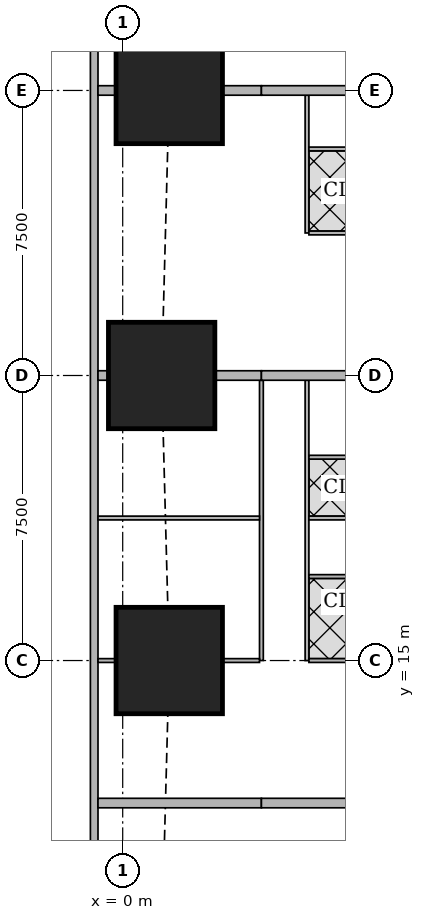
"""IFC4 building model, lengths in metres.
Left out: names, types, materials, properties, quantities, classifications, styles, units other than length and angle.
Written with IfcOpenShell. Run it as: python <this file> out.ifc"""

import sys

from ifc_helpers import new_model, si_unit, direction, frame, frame_2d, origin, origin_2d, place, context, subcontext, project, spatial, rectangle, extrude, element, fill, save


model = new_model("IFC4")
c1 = context("Model", 3, precision=1e-05, world=origin(), true_north=direction((0.0, 1.0)))
c2 = subcontext(c1, "Body", "Model", "MODEL_VIEW")
j1 = project(units=[si_unit("LENGTHUNIT", "METRE"), si_unit("PLANEANGLEUNIT", "RADIAN")], contexts=[c1])
p1 = place(None, origin())
s1 = spatial("IfcSite", under=j1, at=p1, CompositionType="ELEMENT")
p2 = place(p1, origin())
s2 = spatial("IfcBuilding", under=s1, at=p2, CompositionType="ELEMENT")
p3 = place(p2, frame((0.0, 0.0, 53.75)))
s3 = spatial("IfcBuildingStorey", under=s2, at=p3, CompositionType="ELEMENT", Elevation=53.75)
for number, where, z_axis, x_axis in (
    (1, (1.225, 15.0, 0.0), (0.0, 0.0, 1.0), (1.0, 0.0, 0.0)),
    (2, (1.025, 22.5, 0.0), (0.0, 0.0, 1.0), (1.0, 0.0, 0.0)),
    (3, (1.225, 30.0, 0.0), (0.0, 0.0, 1.0), (1.0, 0.0, 0.0)),
):
    element("IfcColumn", number, at=place(p3, frame(where, z_axis=z_axis, x_axis=x_axis)), inside=s3, PredefinedType="COLUMN", context=c2, shape_type="SweptSolid", body=[
        extrude(rectangle(XDim=2.8, YDim=2.8, at=origin_2d()), origin(), (0.0, 0.0, 1.0), 3.75),
    ])
p4 = place(p3, frame((-0.75, 42.837, 0.0), z_axis=(0.0, 0.0, 1.0), x_axis=(0.0, -1.0, 0.0)))
e4 = element("IfcWall", 4, at=p4, inside=s3, PredefinedType="SOLIDWALL", context=c2, shape_type="SweptSolid", body=[
    extrude(rectangle(XDim=40.674, YDim=0.2, at=frame_2d((20.337, 0.0))), origin(), (0.0, 0.0, 1.0), 3.5),
])
p5 = place(p4, frame((1.78, 0.0, 0.9)))
e5 = element("IfcOpeningElement", 5, at=p5, cuts=e4, PredefinedType="OPENING", context=c2, shape_type="SweptSolid", body=[
    extrude(rectangle(XDim=1.8, YDim=1.5, at=frame_2d((0.9, 0.75))), frame((0.0, 0.11, 0.0), z_axis=(0.0, -1.0, 0.0), x_axis=(1.0, 0.0, 0.0)), (0.0, 0.0, 1.0), 0.22),
])
p6 = place(p4, frame((6.312, 0.0, 0.9)))
e6 = element("IfcOpeningElement", 6, at=p6, cuts=e4, PredefinedType="OPENING", context=c2, shape_type="SweptSolid", body=[
    extrude(rectangle(XDim=1.8, YDim=1.5, at=frame_2d((0.9, 0.75))), frame((0.0, 0.11, 0.0), z_axis=(0.0, -1.0, 0.0), x_axis=(1.0, 0.0, 0.0)), (0.0, 0.0, 1.0), 0.22),
])
p7 = place(p4, frame((10.062, 0.0, 0.9)))
e7 = element("IfcOpeningElement", 7, at=p7, cuts=e4, PredefinedType="OPENING", context=c2, shape_type="SweptSolid", body=[
    extrude(rectangle(XDim=1.8, YDim=1.5, at=frame_2d((0.9, 0.75))), frame((0.0, 0.11, 0.0), z_axis=(0.0, -1.0, 0.0), x_axis=(1.0, 0.0, 0.0)), (0.0, 0.0, 1.0), 0.22),
])
p8 = place(p4, frame((13.812, 0.0, 0.9)))
e8 = element("IfcOpeningElement", 8, at=p8, cuts=e4, PredefinedType="OPENING", context=c2, shape_type="SweptSolid", body=[
    extrude(rectangle(XDim=1.8, YDim=1.5, at=frame_2d((0.9, 0.75))), frame((0.0, 0.11, 0.0), z_axis=(0.0, -1.0, 0.0), x_axis=(1.0, 0.0, 0.0)), (0.0, 0.0, 1.0), 0.22),
])
p9 = place(p4, frame((17.562, 0.0, 0.9)))
e9 = element("IfcOpeningElement", 9, at=p9, cuts=e4, PredefinedType="OPENING", context=c2, shape_type="SweptSolid", body=[
    extrude(rectangle(XDim=1.8, YDim=1.5, at=frame_2d((0.9, 0.75))), frame((0.0, 0.11, 0.0), z_axis=(0.0, -1.0, 0.0), x_axis=(1.0, 0.0, 0.0)), (0.0, 0.0, 1.0), 0.22),
])
p10 = place(p4, frame((21.312, 0.0, 0.9)))
e10 = element("IfcOpeningElement", 10, at=p10, cuts=e4, PredefinedType="OPENING", context=c2, shape_type="SweptSolid", body=[
    extrude(rectangle(XDim=1.8, YDim=1.5, at=frame_2d((0.9, 0.75))), frame((0.0, 0.11, 0.0), z_axis=(0.0, -1.0, 0.0), x_axis=(1.0, 0.0, 0.0)), (0.0, 0.0, 1.0), 0.22),
])
p11 = place(p4, frame((25.062, 0.0, 0.9)))
e11 = element("IfcOpeningElement", 11, at=p11, cuts=e4, PredefinedType="OPENING", context=c2, shape_type="SweptSolid", body=[
    extrude(rectangle(XDim=1.8, YDim=1.5, at=frame_2d((0.9, 0.75))), frame((0.0, 0.11, 0.0), z_axis=(0.0, -1.0, 0.0), x_axis=(1.0, 0.0, 0.0)), (0.0, 0.0, 1.0), 0.22),
])
p12 = place(p4, frame((28.812, 0.0, 0.9)))
e12 = element("IfcOpeningElement", 12, at=p12, cuts=e4, PredefinedType="OPENING", context=c2, shape_type="SweptSolid", body=[
    extrude(rectangle(XDim=1.8, YDim=1.5, at=frame_2d((0.9, 0.75))), frame((0.0, 0.11, 0.0), z_axis=(0.0, -1.0, 0.0), x_axis=(1.0, 0.0, 0.0)), (0.0, 0.0, 1.0), 0.22),
])
p13 = place(p4, frame((32.562, 0.0, 0.9)))
e13 = element("IfcOpeningElement", 13, at=p13, cuts=e4, PredefinedType="OPENING", context=c2, shape_type="SweptSolid", body=[
    extrude(rectangle(XDim=1.8, YDim=1.5, at=frame_2d((0.9, 0.75))), frame((0.0, 0.11, 0.0), z_axis=(0.0, -1.0, 0.0), x_axis=(1.0, 0.0, 0.0)), (0.0, 0.0, 1.0), 0.22),
])
p14 = place(p4, frame((37.094, 0.0, 0.9)))
e14 = element("IfcOpeningElement", 14, at=p14, cuts=e4, PredefinedType="OPENING", context=c2, shape_type="SweptSolid", body=[
    extrude(rectangle(XDim=1.8, YDim=1.5, at=frame_2d((0.9, 0.75))), frame((0.0, 0.11, 0.0), z_axis=(0.0, -1.0, 0.0), x_axis=(1.0, 0.0, 0.0)), (0.0, 0.0, 1.0), 0.22),
])
p15 = place(p3, frame((3.65, 15.0, 0.0), z_axis=(0.0, 0.0, 1.0), x_axis=(0.0, 1.0, 0.0)))
e15 = element("IfcWall", 15, at=p15, inside=s3, PredefinedType="PARTITIONING", context=c2, shape_type="SweptSolid", body=[
    extrude(rectangle(XDim=7.375, YDim=0.1, at=frame_2d((3.688, 0.0))), origin(), (0.0, 0.0, 1.0), 3.5),
])
p16 = place(p15, frame((1.45, 0.0, 0.0)))
e16 = element("IfcOpeningElement", 16, at=p16, cuts=e15, PredefinedType="OPENING", context=c2, shape_type="SweptSolid", body=[
    extrude(rectangle(XDim=0.9, YDim=2.1, at=frame_2d((0.45, 1.05))), frame((0.0, 0.06, 0.0), z_axis=(0.0, -1.0, 0.0), x_axis=(1.0, 0.0, 0.0)), (0.0, 0.0, 1.0), 0.12),
])
p17 = place(p15, frame((3.95, 0.0, 0.0)))
e17 = element("IfcOpeningElement", 17, at=p17, cuts=e15, PredefinedType="OPENING", context=c2, shape_type="SweptSolid", body=[
    extrude(rectangle(XDim=0.9, YDim=2.1, at=frame_2d((0.45, 1.05))), frame((0.0, 0.06, 0.0), z_axis=(0.0, -1.0, 0.0), x_axis=(1.0, 0.0, 0.0)), (0.0, 0.0, 1.0), 0.12),
])
p18 = place(p3, frame((4.85, 15.0, 0.0), z_axis=(0.0, 0.0, 1.0), x_axis=(0.0, 1.0, 0.0)))
e18 = element("IfcWall", 18, at=p18, inside=s3, PredefinedType="PARTITIONING", context=c2, shape_type="SweptSolid", body=[
    extrude(rectangle(XDim=7.375, YDim=0.1, at=frame_2d((3.688, 0.0))), origin(), (0.0, 0.0, 1.0), 3.5),
])
p19 = place(p18, frame((0.655, 0.0, 0.0)))
e19 = element("IfcOpeningElement", 19, at=p19, cuts=e18, PredefinedType="OPENING", context=c2, shape_type="SweptSolid", body=[
    extrude(rectangle(XDim=0.9, YDim=2.1, at=frame_2d((0.45, 1.05))), frame((0.0, 0.06, 0.0), z_axis=(0.0, -1.0, 0.0), x_axis=(1.0, 0.0, 0.0)), (0.0, 0.0, 1.0), 0.12),
])
p20 = place(p18, frame((4.1, 0.0, 0.0)))
e20 = element("IfcOpeningElement", 20, at=p20, cuts=e18, PredefinedType="OPENING", context=c2, shape_type="SweptSolid", body=[
    extrude(rectangle(XDim=0.9, YDim=2.1, at=frame_2d((0.45, 1.05))), frame((0.0, 0.06, 0.0), z_axis=(0.0, -1.0, 0.0), x_axis=(1.0, 0.0, 0.0)), (0.0, 0.0, 1.0), 0.12),
])
p21 = place(p18, frame((2.53, 0.0, 0.0)))
e21 = element("IfcOpeningElement", 21, at=p21, cuts=e18, PredefinedType="OPENING", context=c2, shape_type="SweptSolid", body=[
    extrude(rectangle(XDim=0.9, YDim=2.1, at=frame_2d((0.45, 1.05))), frame((0.0, 0.06, 0.0), z_axis=(0.0, -1.0, 0.0), x_axis=(1.0, 0.0, 0.0)), (0.0, 0.0, 1.0), 0.12),
])
p22 = place(p18, frame((5.975, 0.0, 0.0)))
e22 = element("IfcOpeningElement", 22, at=p22, cuts=e18, PredefinedType="OPENING", context=c2, shape_type="SweptSolid", body=[
    extrude(rectangle(XDim=0.9, YDim=2.1, at=frame_2d((0.45, 1.05))), frame((0.0, 0.06, 0.0), z_axis=(0.0, -1.0, 0.0), x_axis=(1.0, 0.0, 0.0)), (0.0, 0.0, 1.0), 0.12),
])
p23 = place(p3, frame((-0.65, 15.0, 0.0), z_axis=(0.0, 0.0, 1.0), x_axis=(1.0, 0.0, 0.0)))
e23 = element("IfcWall", 23, at=p23, inside=s3, PredefinedType="PARTITIONING", context=c2, shape_type="SweptSolid", body=[
    extrude(rectangle(XDim=0.474, YDim=0.1, at=frame_2d((0.237, 0.0))), origin(), (0.0, 0.0, 1.0), 3.5),
])
p24 = place(p3, frame((2.626, 15.0, 0.0), z_axis=(0.0, 0.0, 1.0), x_axis=(1.0, 0.0, 0.0)))
e24 = element("IfcWall", 24, at=p24, inside=s3, PredefinedType="PARTITIONING", context=c2, shape_type="SweptSolid", body=[
    extrude(rectangle(XDim=0.974, YDim=0.1, at=frame_2d((0.487, 0.0))), origin(), (0.0, 0.0, 1.0), 3.5),
])
p25 = place(p3, frame((-0.65, 18.75, 0.0), z_axis=(0.0, 0.0, 1.0), x_axis=(1.0, 0.0, 0.0)))
e25 = element("IfcWall", 25, at=p25, inside=s3, PredefinedType="PARTITIONING", context=c2, shape_type="SweptSolid", body=[
    extrude(rectangle(XDim=4.25, YDim=0.1, at=frame_2d((2.125, 0.0))), origin(), (0.0, 0.0, 1.0), 2.05),
])
p26 = place(p3, frame((4.9, 15.0, 0.0), z_axis=(0.0, 0.0, 1.0), x_axis=(1.0, 0.0, 0.0)))
e26 = element("IfcWall", 26, at=p26, inside=s3, PredefinedType="PARTITIONING", context=c2, shape_type="SweptSolid", body=[
    extrude(rectangle(XDim=1.399, YDim=0.1, at=frame_2d((0.7, 0.0))), origin(), (0.0, 0.0, 1.0), 3.5),
])
for number, where, z_axis, x_axis in (
    (27, (4.9, 18.75, 0.0), (0.0, 0.0, 1.0), (1.0, 0.0, 0.0)),
    (28, (4.9, 17.21, 0.0), (0.0, 0.0, 1.0), (1.0, 0.0, 0.0)),
    (29, (4.9, 20.35, 0.0), (0.0, 0.0, 1.0), (1.0, 0.0, 0.0)),
):
    element("IfcWall", number, at=place(p3, frame(where, z_axis=z_axis, x_axis=x_axis)), inside=s3, PredefinedType="PARTITIONING", context=c2, shape_type="SweptSolid", body=[
        extrude(rectangle(XDim=3.275, YDim=0.1, at=frame_2d((1.638, 0.0))), origin(), (0.0, 0.0, 1.0), 3.5),
    ])
p27 = place(p3, frame((-0.65, 11.25, 0.0), z_axis=(0.0, 0.0, 1.0), x_axis=(1.0, 0.0, 0.0)))
e30 = element("IfcWall", 30, at=p27, inside=s3, PredefinedType="SOLIDWALL", context=c2, shape_type="SweptSolid", body=[
    extrude(rectangle(XDim=4.3, YDim=0.25, at=frame_2d((2.15, 0.0))), origin(), (0.0, 0.0, 1.0), 2.05),
])
p28 = place(p3, frame((3.65, 11.25, 0.0), z_axis=(0.0, 0.0, 1.0), x_axis=(1.0, 0.0, 0.0)))
e31 = element("IfcWall", 31, at=p28, inside=s3, PredefinedType="SOLIDWALL", context=c2, shape_type="SweptSolid", body=[
    extrude(rectangle(XDim=4.525, YDim=0.25, at=frame_2d((2.263, 0.0))), origin(), (0.0, 0.0, 1.0), 3.5),
])
p29 = place(p3, frame((4.85, 26.25, 0.0), z_axis=(0.0, 0.0, 1.0), x_axis=(0.0, 1.0, 0.0)))
e32 = element("IfcWall", 32, at=p29, inside=s3, PredefinedType="PARTITIONING", context=c2, shape_type="SweptSolid", body=[
    extrude(rectangle(XDim=3.625, YDim=0.1, at=frame_2d((1.812, 0.0))), origin(), (0.0, 0.0, 1.0), 3.5),
])
p30 = place(p29, frame((0.655, 0.0, 0.0)))
e33 = element("IfcOpeningElement", 33, at=p30, cuts=e32, PredefinedType="OPENING", context=c2, shape_type="SweptSolid", body=[
    extrude(rectangle(XDim=0.9, YDim=2.1, at=frame_2d((0.45, 1.05))), frame((0.0, 0.06, 0.0), z_axis=(0.0, -1.0, 0.0), x_axis=(1.0, 0.0, 0.0)), (0.0, 0.0, 1.0), 0.12),
])
p31 = place(p29, frame((2.53, 0.0, 0.0)))
e34 = element("IfcOpeningElement", 34, at=p31, cuts=e32, PredefinedType="OPENING", context=c2, shape_type="SweptSolid", body=[
    extrude(rectangle(XDim=0.9, YDim=2.1, at=frame_2d((0.45, 1.05))), frame((0.0, 0.06, 0.0), z_axis=(0.0, -1.0, 0.0), x_axis=(1.0, 0.0, 0.0)), (0.0, 0.0, 1.0), 0.12),
])
for number, where, z_axis, x_axis in (
    (35, (4.9, 26.25, 0.0), (0.0, 0.0, 1.0), (1.0, 0.0, 0.0)),
    (36, (4.9, 28.46, 0.0), (0.0, 0.0, 1.0), (1.0, 0.0, 0.0)),
):
    element("IfcWall", number, at=place(p3, frame(where, z_axis=z_axis, x_axis=x_axis)), inside=s3, PredefinedType="PARTITIONING", context=c2, shape_type="SweptSolid", body=[
        extrude(rectangle(XDim=3.275, YDim=0.1, at=frame_2d((1.638, 0.0))), origin(), (0.0, 0.0, 1.0), 3.5),
    ])
p32 = place(p3, frame((-0.65, 22.5, 0.0), z_axis=(0.0, 0.0, 1.0), x_axis=(1.0, 0.0, 0.0)))
e37 = element("IfcWall", 37, at=p32, inside=s3, PredefinedType="SOLIDWALL", context=c2, shape_type="SweptSolid", body=[
    extrude(rectangle(XDim=0.274, YDim=0.25, at=frame_2d((0.137, 0.0))), origin(), (0.0, 0.0, 1.0), 3.5),
])
p33 = place(p3, frame((2.426, 22.5, 0.0), z_axis=(0.0, 0.0, 1.0), x_axis=(1.0, 0.0, 0.0)))
e38 = element("IfcWall", 38, at=p33, inside=s3, PredefinedType="SOLIDWALL", context=c2, shape_type="SweptSolid", body=[
    extrude(rectangle(XDim=1.224, YDim=0.25, at=frame_2d((0.612, 0.0))), origin(), (0.0, 0.0, 1.0), 3.5),
])
p34 = place(p3, frame((3.65, 22.5, 0.0), z_axis=(0.0, 0.0, 1.0), x_axis=(1.0, 0.0, 0.0)))
e39 = element("IfcWall", 39, at=p34, inside=s3, PredefinedType="SOLIDWALL", context=c2, shape_type="SweptSolid", body=[
    extrude(rectangle(XDim=2.649, YDim=0.25, at=frame_2d((1.325, 0.0))), origin(), (0.0, 0.0, 1.0), 3.5),
])
p35 = place(p3, frame((-0.65, 30.0, 0.0), z_axis=(0.0, 0.0, 1.0), x_axis=(1.0, 0.0, 0.0)))
e40 = element("IfcWall", 40, at=p35, inside=s3, PredefinedType="SOLIDWALL", context=c2, shape_type="SweptSolid", body=[
    extrude(rectangle(XDim=0.474, YDim=0.25, at=frame_2d((0.237, 0.0))), origin(), (0.0, 0.0, 1.0), 3.5),
])
p36 = place(p3, frame((2.626, 30.0, 0.0), z_axis=(0.0, 0.0, 1.0), x_axis=(1.0, 0.0, 0.0)))
e41 = element("IfcWall", 41, at=p36, inside=s3, PredefinedType="SOLIDWALL", context=c2, shape_type="SweptSolid", body=[
    extrude(rectangle(XDim=1.024, YDim=0.25, at=frame_2d((0.512, 0.0))), origin(), (0.0, 0.0, 1.0), 3.5),
])
p37 = place(p3, frame((3.65, 30.0, 0.0), z_axis=(0.0, 0.0, 1.0), x_axis=(1.0, 0.0, 0.0)))
e42 = element("IfcWall", 42, at=p37, inside=s3, PredefinedType="SOLIDWALL", context=c2, shape_type="SweptSolid", body=[
    extrude(rectangle(XDim=2.649, YDim=0.25, at=frame_2d((1.325, 0.0))), origin(), (0.0, 0.0, 1.0), 3.5),
])
p38 = place(p7, origin())
e43 = element("IfcWindow", 43, at=p38, inside=s3, PartitioningType="SINGLE_PANEL", PredefinedType="WINDOW", context=c2, shape_type="SweptSolid", body=[
    extrude(rectangle(XDim=1.8, YDim=1.5, at=frame_2d((0.9, 0.75))), frame((0.0, 0.03, 0.0), z_axis=(0.0, -1.0, 0.0), x_axis=(1.0, 0.0, 0.0)), (0.0, 0.0, 1.0), 0.06),
])
fill(e7, e43)
p39 = place(p8, origin())
e44 = element("IfcWindow", 44, at=p39, inside=s3, PartitioningType="SINGLE_PANEL", PredefinedType="WINDOW", context=c2, shape_type="SweptSolid", body=[
    extrude(rectangle(XDim=1.8, YDim=1.5, at=frame_2d((0.9, 0.75))), frame((0.0, 0.03, 0.0), z_axis=(0.0, -1.0, 0.0), x_axis=(1.0, 0.0, 0.0)), (0.0, 0.0, 1.0), 0.06),
])
fill(e8, e44)
p40 = place(p9, origin())
e45 = element("IfcWindow", 45, at=p40, inside=s3, PartitioningType="SINGLE_PANEL", PredefinedType="WINDOW", context=c2, shape_type="SweptSolid", body=[
    extrude(rectangle(XDim=1.8, YDim=1.5, at=frame_2d((0.9, 0.75))), frame((0.0, 0.03, 0.0), z_axis=(0.0, -1.0, 0.0), x_axis=(1.0, 0.0, 0.0)), (0.0, 0.0, 1.0), 0.06),
])
fill(e9, e45)
p41 = place(p10, origin())
e46 = element("IfcWindow", 46, at=p41, inside=s3, PartitioningType="SINGLE_PANEL", PredefinedType="WINDOW", context=c2, shape_type="SweptSolid", body=[
    extrude(rectangle(XDim=1.8, YDim=1.5, at=frame_2d((0.9, 0.75))), frame((0.0, 0.03, 0.0), z_axis=(0.0, -1.0, 0.0), x_axis=(1.0, 0.0, 0.0)), (0.0, 0.0, 1.0), 0.06),
])
fill(e10, e46)
p42 = place(p11, origin())
e47 = element("IfcWindow", 47, at=p42, inside=s3, PartitioningType="SINGLE_PANEL", PredefinedType="WINDOW", context=c2, shape_type="SweptSolid", body=[
    extrude(rectangle(XDim=1.8, YDim=1.5, at=frame_2d((0.9, 0.75))), frame((0.0, 0.03, 0.0), z_axis=(0.0, -1.0, 0.0), x_axis=(1.0, 0.0, 0.0)), (0.0, 0.0, 1.0), 0.06),
])
fill(e11, e47)
p43 = place(p12, origin())
e48 = element("IfcWindow", 48, at=p43, inside=s3, PartitioningType="SINGLE_PANEL", PredefinedType="WINDOW", context=c2, shape_type="SweptSolid", body=[
    extrude(rectangle(XDim=1.8, YDim=1.5, at=frame_2d((0.9, 0.75))), frame((0.0, 0.03, 0.0), z_axis=(0.0, -1.0, 0.0), x_axis=(1.0, 0.0, 0.0)), (0.0, 0.0, 1.0), 0.06),
])
fill(e12, e48)
p44 = place(p13, origin())
e49 = element("IfcWindow", 49, at=p44, inside=s3, PartitioningType="SINGLE_PANEL", PredefinedType="WINDOW", context=c2, shape_type="SweptSolid", body=[
    extrude(rectangle(XDim=1.8, YDim=1.5, at=frame_2d((0.9, 0.75))), frame((0.0, 0.03, 0.0), z_axis=(0.0, -1.0, 0.0), x_axis=(1.0, 0.0, 0.0)), (0.0, 0.0, 1.0), 0.06),
])
fill(e13, e49)
p45 = place(p16, origin())
e50 = element("IfcDoor", 50, at=p45, inside=s3, OperationType="SINGLE_SWING_LEFT", PredefinedType="DOOR", context=c2, shape_type="SweptSolid", body=[
    extrude(rectangle(XDim=0.9, YDim=2.1, at=frame_2d((0.45, 1.05))), frame((0.0, 0.025, 0.0), z_axis=(0.0, -1.0, 0.0), x_axis=(1.0, 0.0, 0.0)), (0.0, 0.0, 1.0), 0.05),
])
fill(e16, e50)
p46 = place(p17, origin())
e51 = element("IfcDoor", 51, at=p46, inside=s3, OperationType="SINGLE_SWING_LEFT", PredefinedType="DOOR", context=c2, shape_type="SweptSolid", body=[
    extrude(rectangle(XDim=0.9, YDim=2.1, at=frame_2d((0.45, 1.05))), frame((0.0, 0.025, 0.0), z_axis=(0.0, -1.0, 0.0), x_axis=(1.0, 0.0, 0.0)), (0.0, 0.0, 1.0), 0.05),
])
fill(e17, e51)
p47 = place(p19, origin())
e52 = element("IfcDoor", 52, at=p47, inside=s3, OperationType="SINGLE_SWING_RIGHT", PredefinedType="DOOR", context=c2, shape_type="SweptSolid", body=[
    extrude(rectangle(XDim=0.9, YDim=2.1, at=frame_2d((0.45, 1.05))), frame((0.0, 0.025, 0.0), z_axis=(0.0, -1.0, 0.0), x_axis=(1.0, 0.0, 0.0)), (0.0, 0.0, 1.0), 0.05),
])
fill(e19, e52)
p48 = place(p20, origin())
e53 = element("IfcDoor", 53, at=p48, inside=s3, OperationType="SINGLE_SWING_RIGHT", PredefinedType="DOOR", context=c2, shape_type="SweptSolid", body=[
    extrude(rectangle(XDim=0.9, YDim=2.1, at=frame_2d((0.45, 1.05))), frame((0.0, 0.025, 0.0), z_axis=(0.0, -1.0, 0.0), x_axis=(1.0, 0.0, 0.0)), (0.0, 0.0, 1.0), 0.05),
])
fill(e20, e53)
p49 = place(p21, origin())
e54 = element("IfcDoor", 54, at=p49, inside=s3, OperationType="SINGLE_SWING_RIGHT", PredefinedType="DOOR", context=c2, shape_type="SweptSolid", body=[
    extrude(rectangle(XDim=0.9, YDim=2.1, at=frame_2d((0.45, 1.05))), frame((0.0, 0.025, 0.0), z_axis=(0.0, -1.0, 0.0), x_axis=(1.0, 0.0, 0.0)), (0.0, 0.0, 1.0), 0.05),
])
fill(e21, e54)
p50 = place(p22, origin())
e55 = element("IfcDoor", 55, at=p50, inside=s3, OperationType="SINGLE_SWING_LEFT", PredefinedType="DOOR", context=c2, shape_type="SweptSolid", body=[
    extrude(rectangle(XDim=0.9, YDim=2.1, at=frame_2d((0.45, 1.05))), frame((0.0, 0.025, 0.0), z_axis=(0.0, -1.0, 0.0), x_axis=(1.0, 0.0, 0.0)), (0.0, 0.0, 1.0), 0.05),
])
fill(e22, e55)
p51 = place(p30, origin())
e56 = element("IfcDoor", 56, at=p51, inside=s3, OperationType="SINGLE_SWING_RIGHT", PredefinedType="DOOR", context=c2, shape_type="SweptSolid", body=[
    extrude(rectangle(XDim=0.9, YDim=2.1, at=frame_2d((0.45, 1.05))), frame((0.0, 0.025, 0.0), z_axis=(0.0, -1.0, 0.0), x_axis=(1.0, 0.0, 0.0)), (0.0, 0.0, 1.0), 0.05),
])
fill(e33, e56)
p52 = place(p31, origin())
e57 = element("IfcDoor", 57, at=p52, inside=s3, OperationType="SINGLE_SWING_LEFT", PredefinedType="DOOR", context=c2, shape_type="SweptSolid", body=[
    extrude(rectangle(XDim=0.9, YDim=2.1, at=frame_2d((0.45, 1.05))), frame((0.0, 0.025, 0.0), z_axis=(0.0, -1.0, 0.0), x_axis=(1.0, 0.0, 0.0)), (0.0, 0.0, 1.0), 0.05),
])
fill(e34, e57)
save(model, sys.argv[1])
